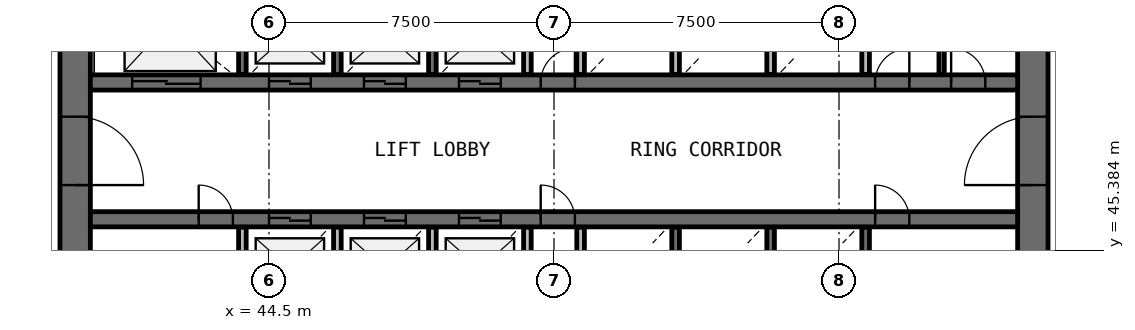
"""IFC4 building model, lengths in metres.
Left out: names, types, materials, properties, quantities, classifications, styles, units other than length and angle.
Written with IfcOpenShell. Run it as: python <this file> out.ifc"""

import sys

from ifc_helpers import new_model, si_unit, direction, frame, frame_2d, origin, place, context, subcontext, project, spatial, rectangle, extrude, source, transform, mapped, element, fill, save


model = new_model("IFC4")
c1 = context("Model", 3, precision=1e-05, world=origin(), true_north=direction((0.0, 1.0)))
c2 = subcontext(c1, "Body", "Model", "MODEL_VIEW")
j1 = project(units=[si_unit("LENGTHUNIT", "METRE"), si_unit("PLANEANGLEUNIT", "RADIAN")], contexts=[c1])
p1 = place(None, origin())
s1 = spatial("IfcSite", under=j1, at=p1, CompositionType="ELEMENT")
p2 = place(p1, origin())
s2 = spatial("IfcBuilding", under=s1, at=p2, CompositionType="ELEMENT")
p3 = place(p2, frame((0.0, 0.0, 116.7)))
s3 = spatial("IfcBuildingStorey", under=s2, at=p3, CompositionType="ELEMENT", Elevation=116.7)
p4 = place(p3, frame((64.6, 38.0, 0.0), z_axis=(0.0, 0.0, 1.0), x_axis=(0.0, 1.0, 0.0)))
e1 = element("IfcWall", 1, at=p4, inside=s3, PredefinedType="SHEAR", context=c2, shape_type="SweptSolid", body=[
    extrude(rectangle(XDim=20.0, YDim=0.8, at=frame_2d((10.0, 0.0))), origin(), (0.0, 0.0, 1.0), 4.1),
])
p5 = place(p4, frame((9.1, 0.0, 0.0)))
e2 = element("IfcOpeningElement", 2, at=p5, cuts=e1, PredefinedType="OPENING", context=c2, shape_type="SweptSolid", body=[
    extrude(rectangle(XDim=1.8, YDim=2.1, at=frame_2d((0.9, 1.05))), frame((0.0, 0.41, 0.0), z_axis=(0.0, -1.0, 0.0), x_axis=(1.0, 0.0, 0.0)), (0.0, 0.0, 1.0), 0.82),
])
p6 = place(p3, frame((39.4, 58.0, 0.0), z_axis=(0.0, 0.0, 1.0), x_axis=(0.0, -1.0, 0.0)))
e3 = element("IfcWall", 3, at=p6, inside=s3, PredefinedType="SHEAR", context=c2, shape_type="SweptSolid", body=[
    extrude(rectangle(XDim=20.0, YDim=0.8, at=frame_2d((10.0, 0.0))), origin(), (0.0, 0.0, 1.0), 4.1),
])
p7 = place(p6, frame((9.1, 0.0, 0.0)))
e4 = element("IfcOpeningElement", 4, at=p7, cuts=e3, PredefinedType="OPENING", context=c2, shape_type="SweptSolid", body=[
    extrude(rectangle(XDim=1.8, YDim=2.1, at=frame_2d((0.9, 1.05))), frame((0.0, 0.41, 0.0), z_axis=(0.0, -1.0, 0.0), x_axis=(1.0, 0.0, 0.0)), (0.0, 0.0, 1.0), 0.82),
])
p8 = place(p3, frame((39.8, 49.8, 0.0), z_axis=(0.0, 0.0, 1.0), x_axis=(1.0, 0.0, 0.0)))
e5 = element("IfcWall", 5, at=p8, inside=s3, PredefinedType="SHEAR", context=c2, shape_type="SweptSolid", body=[
    extrude(rectangle(XDim=24.4, YDim=0.4, at=frame_2d((12.2, 0.0))), origin(), (0.0, 0.0, 1.0), 4.1),
])
p9 = place(p8, frame((4.7, 0.0, 0.0)))
e6 = element("IfcOpeningElement", 6, at=p9, cuts=e5, PredefinedType="OPENING", context=c2, shape_type="SweptSolid", body=[
    extrude(rectangle(XDim=1.1, YDim=2.1, at=frame_2d((0.55, 1.05))), frame((0.0, 0.21, 0.0), z_axis=(0.0, -1.0, 0.0), x_axis=(1.0, 0.0, 0.0)), (0.0, 0.0, 1.0), 0.42),
])
p10 = place(p8, frame((7.2, 0.0, 0.0)))
e7 = element("IfcOpeningElement", 7, at=p10, cuts=e5, PredefinedType="OPENING", context=c2, shape_type="SweptSolid", body=[
    extrude(rectangle(XDim=1.1, YDim=2.1, at=frame_2d((0.55, 1.05))), frame((0.0, 0.21, 0.0), z_axis=(0.0, -1.0, 0.0), x_axis=(1.0, 0.0, 0.0)), (0.0, 0.0, 1.0), 0.42),
])
p11 = place(p8, frame((9.7, 0.0, 0.0)))
e8 = element("IfcOpeningElement", 8, at=p11, cuts=e5, PredefinedType="OPENING", context=c2, shape_type="SweptSolid", body=[
    extrude(rectangle(XDim=1.1, YDim=2.1, at=frame_2d((0.55, 1.05))), frame((0.0, 0.21, 0.0), z_axis=(0.0, -1.0, 0.0), x_axis=(1.0, 0.0, 0.0)), (0.0, 0.0, 1.0), 0.42),
])
p12 = place(p8, frame((1.1, 0.0, 0.0)))
e9 = element("IfcOpeningElement", 9, at=p12, cuts=e5, PredefinedType="OPENING", context=c2, shape_type="SweptSolid", body=[
    extrude(rectangle(XDim=1.8, YDim=2.4, at=frame_2d((0.9, 1.2))), frame((0.0, 0.21, 0.0), z_axis=(0.0, -1.0, 0.0), x_axis=(1.0, 0.0, 0.0)), (0.0, 0.0, 1.0), 0.42),
])
p13 = place(p8, frame((20.65, 0.0, 0.0)))
e10 = element("IfcOpeningElement", 10, at=p13, cuts=e5, PredefinedType="OPENING", context=c2, shape_type="SweptSolid", body=[
    extrude(rectangle(XDim=0.9, YDim=2.1, at=frame_2d((0.45, 1.05))), frame((0.0, 0.21, 0.0), z_axis=(0.0, -1.0, 0.0), x_axis=(1.0, 0.0, 0.0)), (0.0, 0.0, 1.0), 0.42),
])
p14 = place(p8, frame((22.65, 0.0, 0.0)))
e11 = element("IfcOpeningElement", 11, at=p14, cuts=e5, PredefinedType="OPENING", context=c2, shape_type="SweptSolid", body=[
    extrude(rectangle(XDim=0.9, YDim=2.1, at=frame_2d((0.45, 1.05))), frame((0.0, 0.21, 0.0), z_axis=(0.0, -1.0, 0.0), x_axis=(1.0, 0.0, 0.0)), (0.0, 0.0, 1.0), 0.42),
])
p15 = place(p8, frame((11.85, 0.0, 0.0)))
e12 = element("IfcOpeningElement", 12, at=p15, cuts=e5, PredefinedType="OPENING", context=c2, shape_type="SweptSolid", body=[
    extrude(rectangle(XDim=0.9, YDim=2.1, at=frame_2d((0.45, 1.05))), frame((0.0, 0.21, 0.0), z_axis=(0.0, -1.0, 0.0), x_axis=(1.0, 0.0, 0.0)), (0.0, 0.0, 1.0), 0.42),
])
p16 = place(p3, frame((39.8, 46.2, 0.0), z_axis=(0.0, 0.0, 1.0), x_axis=(1.0, 0.0, 0.0)))
e13 = element("IfcWall", 13, at=p16, inside=s3, PredefinedType="SHEAR", context=c2, shape_type="SweptSolid", body=[
    extrude(rectangle(XDim=24.4, YDim=0.4, at=frame_2d((12.2, 0.0))), origin(), (0.0, 0.0, 1.0), 4.1),
])
p17 = place(p16, frame((4.7, 0.0, 0.0)))
e14 = element("IfcOpeningElement", 14, at=p17, cuts=e13, PredefinedType="OPENING", context=c2, shape_type="SweptSolid", body=[
    extrude(rectangle(XDim=1.1, YDim=2.1, at=frame_2d((0.55, 1.05))), frame((0.0, 0.21, 0.0), z_axis=(0.0, -1.0, 0.0), x_axis=(1.0, 0.0, 0.0)), (0.0, 0.0, 1.0), 0.42),
])
p18 = place(p16, frame((7.2, 0.0, 0.0)))
e15 = element("IfcOpeningElement", 15, at=p18, cuts=e13, PredefinedType="OPENING", context=c2, shape_type="SweptSolid", body=[
    extrude(rectangle(XDim=1.1, YDim=2.1, at=frame_2d((0.55, 1.05))), frame((0.0, 0.21, 0.0), z_axis=(0.0, -1.0, 0.0), x_axis=(1.0, 0.0, 0.0)), (0.0, 0.0, 1.0), 0.42),
])
p19 = place(p16, frame((9.7, 0.0, 0.0)))
e16 = element("IfcOpeningElement", 16, at=p19, cuts=e13, PredefinedType="OPENING", context=c2, shape_type="SweptSolid", body=[
    extrude(rectangle(XDim=1.1, YDim=2.1, at=frame_2d((0.55, 1.05))), frame((0.0, 0.21, 0.0), z_axis=(0.0, -1.0, 0.0), x_axis=(1.0, 0.0, 0.0)), (0.0, 0.0, 1.0), 0.42),
])
p20 = place(p16, frame((20.65, 0.0, 0.0)))
e17 = element("IfcOpeningElement", 17, at=p20, cuts=e13, PredefinedType="OPENING", context=c2, shape_type="SweptSolid", body=[
    extrude(rectangle(XDim=0.9, YDim=2.1, at=frame_2d((0.45, 1.05))), frame((0.0, 0.21, 0.0), z_axis=(0.0, -1.0, 0.0), x_axis=(1.0, 0.0, 0.0)), (0.0, 0.0, 1.0), 0.42),
])
p21 = place(p16, frame((2.85, 0.0, 0.0)))
e18 = element("IfcOpeningElement", 18, at=p21, cuts=e13, PredefinedType="OPENING", context=c2, shape_type="SweptSolid", body=[
    extrude(rectangle(XDim=0.9, YDim=2.1, at=frame_2d((0.45, 1.05))), frame((0.0, 0.21, 0.0), z_axis=(0.0, -1.0, 0.0), x_axis=(1.0, 0.0, 0.0)), (0.0, 0.0, 1.0), 0.42),
])
p22 = place(p16, frame((11.85, 0.0, 0.0)))
e19 = element("IfcOpeningElement", 19, at=p22, cuts=e13, PredefinedType="OPENING", context=c2, shape_type="SweptSolid", body=[
    extrude(rectangle(XDim=0.9, YDim=2.1, at=frame_2d((0.45, 1.05))), frame((0.0, 0.21, 0.0), z_axis=(0.0, -1.0, 0.0), x_axis=(1.0, 0.0, 0.0)), (0.0, 0.0, 1.0), 0.42),
])
for number, where, z_axis, x_axis in (
    (20, (43.8, 45.99, 0.0), (0.0, 0.0, 1.0), (0.0, -1.0, 0.0)),
    (21, (43.8, 52.37, 0.0), (0.0, 0.0, 1.0), (0.0, -1.0, 0.0)),
):
    element("IfcWall", number, at=place(p3, frame(where, z_axis=z_axis, x_axis=x_axis)), inside=s3, PredefinedType="SOLIDWALL", context=c2, shape_type="SweptSolid", body=[
        extrude(rectangle(XDim=2.36, YDim=0.2, at=frame_2d((1.18, 0.0))), origin(), (0.0, 0.0, 1.0), 3.7),
    ])
p23 = place(p3, frame((46.3, 43.6, 0.0), z_axis=(0.0, 0.0, 1.0), x_axis=(0.0, 1.0, 0.0)))
e22 = element("IfcWall", 22, at=p23, inside=s3, PredefinedType="SOLIDWALL", context=c2, shape_type="SweptSolid", body=[
    extrude(rectangle(XDim=2.39, YDim=0.2, at=frame_2d((1.195, 0.0))), origin(), (0.0, 0.0, 1.0), 3.7),
])
for number, where, z_axis, x_axis in (
    (23, (46.3, 50.01, 0.0), (0.0, 0.0, 1.0), (0.0, 1.0, 0.0)),
    (24, (48.8, 43.63, 0.0), (0.0, 0.0, 1.0), (0.0, 1.0, 0.0)),
    (25, (48.8, 50.01, 0.0), (0.0, 0.0, 1.0), (0.0, 1.0, 0.0)),
    (26, (51.3, 43.63, 0.0), (0.0, 0.0, 1.0), (0.0, 1.0, 0.0)),
):
    element("IfcWall", number, at=place(p3, frame(where, z_axis=z_axis, x_axis=x_axis)), inside=s3, PredefinedType="SOLIDWALL", context=c2, shape_type="SweptSolid", body=[
        extrude(rectangle(XDim=2.36, YDim=0.2, at=frame_2d((1.18, 0.0))), origin(), (0.0, 0.0, 1.0), 3.7),
    ])
for number, where, z_axis, x_axis in (
    (27, (51.3, 50.01, 0.0), (0.0, 0.0, 1.0), (0.0, 1.0, 0.0)),
    (28, (52.7, 45.99, 0.0), (0.0, 0.0, 1.0), (0.0, -1.0, 0.0)),
):
    element("IfcWall", number, at=place(p3, frame(where, z_axis=z_axis, x_axis=x_axis)), inside=s3, PredefinedType="SOLIDWALL", context=c2, shape_type="SweptSolid", body=[
        extrude(rectangle(XDim=2.39, YDim=0.2, at=frame_2d((1.195, 0.0))), origin(), (0.0, 0.0, 1.0), 3.7),
    ])
for number, where, z_axis, x_axis in (
    (29, (52.7, 52.37, 0.0), (0.0, 0.0, 1.0), (0.0, -1.0, 0.0)),
    (30, (55.2, 43.63, 0.0), (0.0, 0.0, 1.0), (0.0, 1.0, 0.0)),
    (31, (55.2, 50.01, 0.0), (0.0, 0.0, 1.0), (0.0, 1.0, 0.0)),
    (32, (57.7, 43.63, 0.0), (0.0, 0.0, 1.0), (0.0, 1.0, 0.0)),
):
    element("IfcWall", number, at=place(p3, frame(where, z_axis=z_axis, x_axis=x_axis)), inside=s3, PredefinedType="SOLIDWALL", context=c2, shape_type="SweptSolid", body=[
        extrude(rectangle(XDim=2.36, YDim=0.2, at=frame_2d((1.18, 0.0))), origin(), (0.0, 0.0, 1.0), 3.7),
    ])
p24 = place(p3, frame((57.7, 50.01, 0.0), z_axis=(0.0, 0.0, 1.0), x_axis=(0.0, 1.0, 0.0)))
e33 = element("IfcWall", 33, at=p24, inside=s3, PredefinedType="SOLIDWALL", context=c2, shape_type="SweptSolid", body=[
    extrude(rectangle(XDim=2.39, YDim=0.2, at=frame_2d((1.195, 0.0))), origin(), (0.0, 0.0, 1.0), 3.7),
])
for number, where, z_axis, x_axis in (
    (34, (60.2, 43.63, 0.0), (0.0, 0.0, 1.0), (0.0, 1.0, 0.0)),
    (35, (60.2, 50.01, 0.0), (0.0, 0.0, 1.0), (0.0, 1.0, 0.0)),
):
    element("IfcWall", number, at=place(p3, frame(where, z_axis=z_axis, x_axis=x_axis)), inside=s3, PredefinedType="SOLIDWALL", context=c2, shape_type="SweptSolid", body=[
        extrude(rectangle(XDim=2.36, YDim=0.2, at=frame_2d((1.18, 0.0))), origin(), (0.0, 0.0, 1.0), 3.7),
    ])
p25 = place(p3, frame((62.2, 50.01, 0.0), z_axis=(0.0, 0.0, 1.0), x_axis=(0.0, 1.0, 0.0)))
e36 = element("IfcWall", 36, at=p25, inside=s3, PredefinedType="PARTITIONING", context=c2, shape_type="SweptSolid", body=[
    extrude(rectangle(XDim=2.39, YDim=0.14, at=frame_2d((1.195, 0.0))), origin(), (0.0, 0.0, 1.0), 2.9),
])
m1 = source(origin(), c2, "Body", "SweptSolid", [
    extrude(rectangle(XDim=1.8, YDim=2.1, at=frame_2d((0.9, 1.05))), frame((0.0, 0.025, 0.0), z_axis=(0.0, -1.0, 0.0), x_axis=(1.0, 0.0, 0.0)), (0.0, 0.0, 1.0), 0.05),
])
p26 = place(p7, origin())
e37 = element("IfcDoor", 37, at=p26, inside=s3, OperationType="SINGLE_SWING_RIGHT", PredefinedType="DOOR", context=c2, shape_type="MappedRepresentation", body=[
    mapped(m1, transform((0.0, 0.0, 0.0), scale=1.0)),
])
fill(e4, e37)
p27 = place(p5, origin())
e38 = element("IfcDoor", 38, at=p27, inside=s3, OperationType="SINGLE_SWING_LEFT", PredefinedType="DOOR", context=c2, shape_type="MappedRepresentation", body=[
    mapped(m1, transform((0.0, 0.0, 0.0), scale=1.0)),
])
fill(e2, e38)
m2 = source(origin(), c2, "Body", "SweptSolid", [
    extrude(rectangle(XDim=1.1, YDim=2.1, at=frame_2d((0.55, 1.05))), frame((0.0, 0.025, 0.0), z_axis=(0.0, -1.0, 0.0), x_axis=(1.0, 0.0, 0.0)), (0.0, 0.0, 1.0), 0.05),
])
p28 = place(p9, origin())
e39 = element("IfcDoor", 39, at=p28, inside=s3, OperationType="DOUBLE_DOOR_SLIDING", PredefinedType="USERDEFINED", context=c2, shape_type="MappedRepresentation", body=[
    mapped(m2, transform((0.0, 0.0, 0.0), scale=1.0)),
])
fill(e6, e39)
p29 = place(p10, origin())
e40 = element("IfcDoor", 40, at=p29, inside=s3, OperationType="DOUBLE_DOOR_SLIDING", PredefinedType="USERDEFINED", context=c2, shape_type="MappedRepresentation", body=[
    mapped(m2, transform((0.0, 0.0, 0.0), scale=1.0)),
])
fill(e7, e40)
p30 = place(p11, origin())
e41 = element("IfcDoor", 41, at=p30, inside=s3, OperationType="DOUBLE_DOOR_SLIDING", PredefinedType="USERDEFINED", context=c2, shape_type="MappedRepresentation", body=[
    mapped(m2, transform((0.0, 0.0, 0.0), scale=1.0)),
])
fill(e8, e41)
p31 = place(p17, origin())
e42 = element("IfcDoor", 42, at=p31, inside=s3, OperationType="DOUBLE_DOOR_SLIDING", PredefinedType="USERDEFINED", context=c2, shape_type="MappedRepresentation", body=[
    mapped(m2, transform((0.0, 0.0, 0.0), scale=1.0)),
])
fill(e14, e42)
p32 = place(p18, origin())
e43 = element("IfcDoor", 43, at=p32, inside=s3, OperationType="DOUBLE_DOOR_SLIDING", PredefinedType="USERDEFINED", context=c2, shape_type="MappedRepresentation", body=[
    mapped(m2, transform((0.0, 0.0, 0.0), scale=1.0)),
])
fill(e15, e43)
p33 = place(p19, origin())
e44 = element("IfcDoor", 44, at=p33, inside=s3, OperationType="DOUBLE_DOOR_SLIDING", PredefinedType="USERDEFINED", context=c2, shape_type="MappedRepresentation", body=[
    mapped(m2, transform((0.0, 0.0, 0.0), scale=1.0)),
])
fill(e16, e44)
m3 = source(origin(), c2, "Body", "SweptSolid", [
    extrude(rectangle(XDim=1.8, YDim=2.4, at=frame_2d((0.9, 1.2))), frame((0.0, 0.025, 0.0), z_axis=(0.0, -1.0, 0.0), x_axis=(1.0, 0.0, 0.0)), (0.0, 0.0, 1.0), 0.05),
])
p34 = place(p12, origin())
e45 = element("IfcDoor", 45, at=p34, inside=s3, OperationType="DOUBLE_DOOR_SLIDING", PredefinedType="USERDEFINED", context=c2, shape_type="MappedRepresentation", body=[
    mapped(m3, transform((0.0, 0.0, 0.0), scale=1.0)),
])
fill(e9, e45)
m4 = source(origin(), c2, "Body", "SweptSolid", [
    extrude(rectangle(XDim=0.9, YDim=2.1, at=frame_2d((0.45, 1.05))), frame((0.0, 0.025, 0.0), z_axis=(0.0, -1.0, 0.0), x_axis=(1.0, 0.0, 0.0)), (0.0, 0.0, 1.0), 0.05),
])
p35 = place(p20, origin())
e46 = element("IfcDoor", 46, at=p35, inside=s3, OperationType="SINGLE_SWING_LEFT", PredefinedType="DOOR", context=c2, shape_type="MappedRepresentation", body=[
    mapped(m4, transform((0.0, 0.0, 0.0), scale=1.0)),
])
fill(e17, e46)
p36 = place(p13, origin())
e47 = element("IfcDoor", 47, at=p36, inside=s3, OperationType="SINGLE_SWING_RIGHT", PredefinedType="DOOR", context=c2, shape_type="MappedRepresentation", body=[
    mapped(m4, transform((0.0, 0.0, 0.0), scale=1.0)),
])
fill(e10, e47)
p37 = place(p14, origin())
e48 = element("IfcDoor", 48, at=p37, inside=s3, OperationType="SINGLE_SWING_LEFT", PredefinedType="DOOR", context=c2, shape_type="MappedRepresentation", body=[
    mapped(m4, transform((0.0, 0.0, 0.0), scale=1.0)),
])
fill(e11, e48)
p38 = place(p21, origin())
e49 = element("IfcDoor", 49, at=p38, inside=s3, OperationType="SINGLE_SWING_LEFT", PredefinedType="DOOR", context=c2, shape_type="MappedRepresentation", body=[
    mapped(m4, transform((0.0, 0.0, 0.0), scale=1.0)),
])
fill(e18, e49)
p39 = place(p15, origin())
e50 = element("IfcDoor", 50, at=p39, inside=s3, OperationType="SINGLE_SWING_RIGHT", PredefinedType="DOOR", context=c2, shape_type="MappedRepresentation", body=[
    mapped(m4, transform((0.0, 0.0, 0.0), scale=1.0)),
])
fill(e12, e50)
p40 = place(p22, origin())
e51 = element("IfcDoor", 51, at=p40, inside=s3, OperationType="SINGLE_SWING_LEFT", PredefinedType="DOOR", context=c2, shape_type="MappedRepresentation", body=[
    mapped(m4, transform((0.0, 0.0, 0.0), scale=1.0)),
])
fill(e19, e51)
save(model, sys.argv[1])
